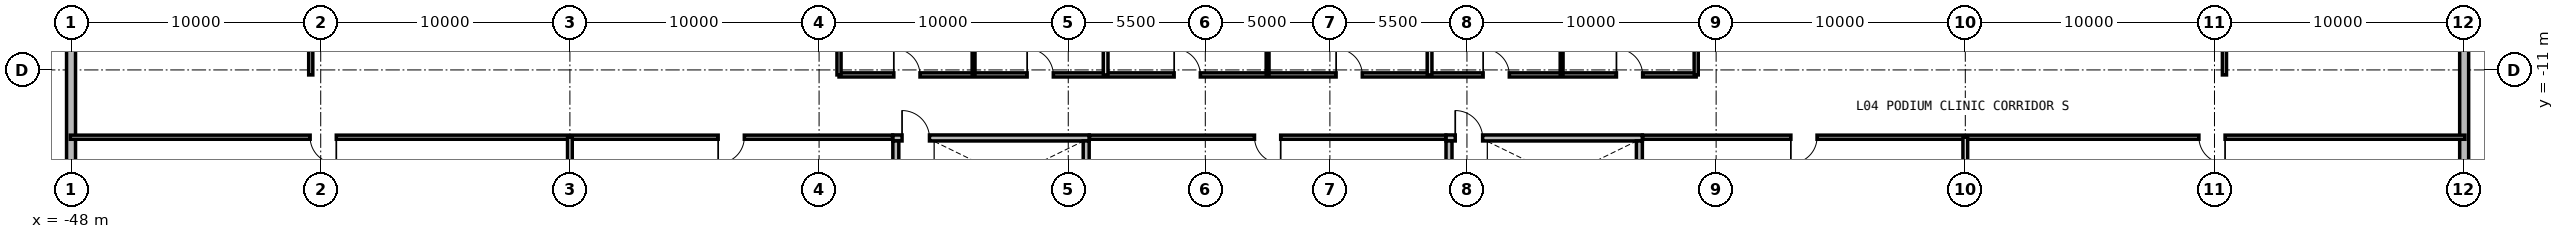
"""IFC4 building model, lengths in metres.
Left out: names, types, materials, properties, quantities, classifications, styles, units other than length and angle.
Written with IfcOpenShell. Run it as: python <this file> out.ifc"""

import sys

from ifc_helpers import new_model, si_unit, direction, frame, frame_2d, origin, place, context, subcontext, project, spatial, rectangle, extrude, source, transform, mapped, element, fill, save


model = new_model("IFC4")
c1 = context("Model", 3, precision=1e-05, world=origin(), true_north=direction((0.0, 1.0)))
c2 = subcontext(c1, "Body", "Model", "MODEL_VIEW")
j1 = project(units=[si_unit("LENGTHUNIT", "METRE"), si_unit("PLANEANGLEUNIT", "RADIAN")], contexts=[c1])
p1 = place(None, origin())
s1 = spatial("IfcSite", under=j1, at=p1, CompositionType="ELEMENT")
p2 = place(p1, origin())
s2 = spatial("IfcBuilding", under=s1, at=p2, CompositionType="ELEMENT")
p3 = place(p2, frame((0.0, 0.0, 16.8)))
s3 = spatial("IfcBuildingStorey", under=s2, at=p3, CompositionType="ELEMENT", Elevation=16.8)
m1 = source(origin(), c2, "Body", "SweptSolid", [
    extrude(rectangle(XDim=38.04, YDim=0.36, at=frame_2d((19.02, 0.0))), origin(), (0.0, 0.0, 1.0), 4.38),
])
p4 = place(p3, frame((-48.02, -19.02, 0.0), z_axis=(0.0, 0.0, 1.0), x_axis=(0.0, 1.0, 0.0)))
e1 = element("IfcWall", 1, at=p4, inside=s3, PredefinedType="SOLIDWALL", context=c2, shape_type="MappedRepresentation", body=[
    mapped(m1, transform((0.0, 0.0, 0.0), x_axis=(1.0, 0.0, 0.0), y_axis=(0.0, 1.0, 0.0), z_axis=(0.0, 0.0, 1.0), scale=1.0)),
])
p5 = place(p4, frame((12.4, 0.0, 0.85)))
e2 = element("IfcOpeningElement", 2, at=p5, cuts=e1, PredefinedType="OPENING", context=c2, shape_type="SweptSolid", body=[
    extrude(rectangle(XDim=1.2, YDim=1.5, at=frame_2d((0.6, 0.75))), frame((0.0, 0.19, 0.0), z_axis=(0.0, -1.0, 0.0), x_axis=(1.0, 0.0, 0.0)), (0.0, 0.0, 1.0), 0.38),
])
p6 = place(p4, frame((20.8, 0.0, 0.85)))
e3 = element("IfcOpeningElement", 3, at=p6, cuts=e1, PredefinedType="OPENING", context=c2, shape_type="SweptSolid", body=[
    extrude(rectangle(XDim=1.2, YDim=1.5, at=frame_2d((0.6, 0.75))), frame((0.0, 0.19, 0.0), z_axis=(0.0, -1.0, 0.0), x_axis=(1.0, 0.0, 0.0)), (0.0, 0.0, 1.0), 0.38),
])
p7 = place(p3, frame((48.02, 19.02, 0.0), z_axis=(0.0, 0.0, 1.0), x_axis=(0.0, -1.0, 0.0)))
e4 = element("IfcWall", 4, at=p7, inside=s3, PredefinedType="SOLIDWALL", context=c2, shape_type="MappedRepresentation", body=[
    mapped(m1, transform((0.0, 0.0, 0.0), x_axis=(1.0, 0.0, 0.0), y_axis=(0.0, 1.0, 0.0), z_axis=(0.0, 0.0, 1.0), scale=1.0)),
])
p8 = place(p7, frame((4.0, 0.0, 0.85)))
e5 = element("IfcOpeningElement", 5, at=p8, cuts=e4, PredefinedType="OPENING", context=c2, shape_type="SweptSolid", body=[
    extrude(rectangle(XDim=1.2, YDim=1.5, at=frame_2d((0.6, 0.75))), frame((0.0, 0.19, 0.0), z_axis=(0.0, -1.0, 0.0), x_axis=(1.0, 0.0, 0.0)), (0.0, 0.0, 1.0), 0.38),
])
p9 = place(p7, frame((12.4, 0.0, 0.85)))
e6 = element("IfcOpeningElement", 6, at=p9, cuts=e4, PredefinedType="OPENING", context=c2, shape_type="SweptSolid", body=[
    extrude(rectangle(XDim=1.2, YDim=1.5, at=frame_2d((0.6, 0.75))), frame((0.0, 0.19, 0.0), z_axis=(0.0, -1.0, 0.0), x_axis=(1.0, 0.0, 0.0)), (0.0, 0.0, 1.0), 0.38),
])
p10 = place(p7, frame((20.8, 0.0, 0.85)))
e7 = element("IfcOpeningElement", 7, at=p10, cuts=e4, PredefinedType="OPENING", context=c2, shape_type="SweptSolid", body=[
    extrude(rectangle(XDim=1.2, YDim=1.5, at=frame_2d((0.6, 0.75))), frame((0.0, 0.19, 0.0), z_axis=(0.0, -1.0, 0.0), x_axis=(1.0, 0.0, 0.0)), (0.0, 0.0, 1.0), 0.38),
])
m2 = source(origin(), c2, "Body", "SweptSolid", [
    extrude(rectangle(XDim=7.88, YDim=0.24, at=frame_2d((3.94, 0.0))), origin(), (0.0, 0.0, 1.0), 4.38),
])
p11 = place(p3, frame((-15.04, -13.73, 0.0), z_axis=(0.0, 0.0, 1.0), x_axis=(1.0, 0.0, 0.0)))
e8 = element("IfcWall", 8, at=p11, inside=s3, PredefinedType="PARTITIONING", context=c2, shape_type="MappedRepresentation", body=[
    mapped(m2, transform((0.0, 0.0, 0.0), x_axis=(1.0, 0.0, 0.0), y_axis=(0.0, 1.0, 0.0), z_axis=(0.0, 0.0, 1.0), scale=1.0)),
])
p12 = place(p11, frame((0.37, 0.0, 0.0)))
e9 = element("IfcOpeningElement", 9, at=p12, cuts=e8, PredefinedType="OPENING", context=c2, shape_type="SweptSolid", body=[
    extrude(rectangle(XDim=1.1, YDim=2.15, at=frame_2d((0.55, 1.075))), frame((0.0, 0.13, 0.0), z_axis=(0.0, -1.0, 0.0), x_axis=(1.0, 0.0, 0.0)), (0.0, 0.0, 1.0), 0.26),
])
m3 = source(origin(), c2, "Body", "SweptSolid", [
    extrude(rectangle(XDim=2.95, YDim=0.24, at=frame_2d((1.475, 0.0))), origin(), (0.0, 0.0, 1.0), 4.38),
])
for number, where, z_axis, x_axis in (
    (10, (-14.92, -16.8, 0.0), (0.0, 0.0, 1.0), (0.0, 1.0, 0.0)),
    (11, (-7.28, -16.8, 0.0), (0.0, 0.0, 1.0), (0.0, 1.0, 0.0)),
):
    element("IfcWall", number, at=place(p3, frame(where, z_axis=z_axis, x_axis=x_axis)), inside=s3, PredefinedType="PARTITIONING", context=c2, shape_type="MappedRepresentation", body=[
        mapped(m3, transform((0.0, 0.0, 0.0), x_axis=(1.0, 0.0, 0.0), y_axis=(0.0, 1.0, 0.0), z_axis=(0.0, 0.0, 1.0), scale=1.0)),
    ])
p13 = place(p3, frame((7.16, -13.73, 0.0), z_axis=(0.0, 0.0, 1.0), x_axis=(1.0, 0.0, 0.0)))
e12 = element("IfcWall", 12, at=p13, inside=s3, PredefinedType="PARTITIONING", context=c2, shape_type="MappedRepresentation", body=[
    mapped(m2, transform((0.0, 0.0, 0.0), x_axis=(1.0, 0.0, 0.0), y_axis=(0.0, 1.0, 0.0), z_axis=(0.0, 0.0, 1.0), scale=1.0)),
])
p14 = place(p13, frame((0.37, 0.0, 0.0)))
e13 = element("IfcOpeningElement", 13, at=p14, cuts=e12, PredefinedType="OPENING", context=c2, shape_type="SweptSolid", body=[
    extrude(rectangle(XDim=1.1, YDim=2.15, at=frame_2d((0.55, 1.075))), frame((0.0, 0.13, 0.0), z_axis=(0.0, -1.0, 0.0), x_axis=(1.0, 0.0, 0.0)), (0.0, 0.0, 1.0), 0.26),
])
for number, where, z_axis, x_axis in (
    (14, (7.28, -16.8, 0.0), (0.0, 0.0, 1.0), (0.0, 1.0, 0.0)),
    (15, (14.92, -16.8, 0.0), (0.0, 0.0, 1.0), (0.0, 1.0, 0.0)),
):
    element("IfcWall", number, at=place(p3, frame(where, z_axis=z_axis, x_axis=x_axis)), inside=s3, PredefinedType="PARTITIONING", context=c2, shape_type="MappedRepresentation", body=[
        mapped(m3, transform((0.0, 0.0, 0.0), x_axis=(1.0, 0.0, 0.0), y_axis=(0.0, 1.0, 0.0), z_axis=(0.0, 0.0, 1.0), scale=1.0)),
    ])
m4 = source(origin(), c2, "Body", "SweptSolid", [
    extrude(rectangle(XDim=17.6, YDim=0.165, at=frame_2d((8.8, 0.0))), origin(), (0.0, 0.0, 1.0), 4.365),
])
p15 = place(p3, frame((-38.4, -11.2, 0.0), z_axis=(0.0, 0.0, 1.0), x_axis=(0.0, 1.0, 0.0)))
e16 = element("IfcWall", 16, at=p15, inside=s3, PredefinedType="PARTITIONING", context=c2, shape_type="MappedRepresentation", body=[
    mapped(m4, transform((0.0, 0.0, 0.0), x_axis=(1.0, 0.0, 0.0), y_axis=(0.0, 1.0, 0.0), z_axis=(0.0, 0.0, 1.0), scale=1.0)),
])
p16 = place(p15, frame((4.2, 0.0, 0.0)))
e17 = element("IfcOpeningElement", 17, at=p16, cuts=e16, PredefinedType="OPENING", context=c2, shape_type="SweptSolid", body=[
    extrude(rectangle(XDim=1.25, YDim=2.2, at=frame_2d((0.625, 1.1))), frame((0.0, 0.093, 0.0), z_axis=(0.0, -1.0, 0.0), x_axis=(1.0, 0.0, 0.0)), (0.0, 0.0, 1.0), 0.185),
])
p17 = place(p15, frame((13.5, 0.0, 0.0)))
e18 = element("IfcOpeningElement", 18, at=p17, cuts=e16, PredefinedType="OPENING", context=c2, shape_type="SweptSolid", body=[
    extrude(rectangle(XDim=1.25, YDim=2.2, at=frame_2d((0.625, 1.1))), frame((0.0, 0.093, 0.0), z_axis=(0.0, -1.0, 0.0), x_axis=(1.0, 0.0, 0.0)), (0.0, 0.0, 1.0), 0.185),
])
p18 = place(p3, frame((38.4, -11.2, 0.0), z_axis=(0.0, 0.0, 1.0), x_axis=(0.0, 1.0, 0.0)))
e19 = element("IfcWall", 19, at=p18, inside=s3, PredefinedType="PARTITIONING", context=c2, shape_type="MappedRepresentation", body=[
    mapped(m4, transform((0.0, 0.0, 0.0), x_axis=(1.0, 0.0, 0.0), y_axis=(0.0, 1.0, 0.0), z_axis=(0.0, 0.0, 1.0), scale=1.0)),
])
p19 = place(p18, frame((4.2, 0.0, 0.0)))
e20 = element("IfcOpeningElement", 20, at=p19, cuts=e19, PredefinedType="OPENING", context=c2, shape_type="SweptSolid", body=[
    extrude(rectangle(XDim=1.25, YDim=2.2, at=frame_2d((0.625, 1.1))), frame((0.0, 0.093, 0.0), z_axis=(0.0, -1.0, 0.0), x_axis=(1.0, 0.0, 0.0)), (0.0, 0.0, 1.0), 0.185),
])
p20 = place(p18, frame((13.5, 0.0, 0.0)))
e21 = element("IfcOpeningElement", 21, at=p20, cuts=e19, PredefinedType="OPENING", context=c2, shape_type="SweptSolid", body=[
    extrude(rectangle(XDim=1.25, YDim=2.2, at=frame_2d((0.625, 1.1))), frame((0.0, 0.093, 0.0), z_axis=(0.0, -1.0, 0.0), x_axis=(1.0, 0.0, 0.0)), (0.0, 0.0, 1.0), 0.185),
])
m5 = source(origin(), c2, "Body", "SweptSolid", [
    extrude(rectangle(XDim=34.4, YDim=0.165, at=frame_2d((17.2, 0.0))), origin(), (0.0, 0.0, 1.0), 4.365),
])
p21 = place(p3, frame((-17.2, -11.2, 0.0), z_axis=(0.0, 0.0, 1.0), x_axis=(1.0, 0.0, 0.0)))
e22 = element("IfcWall", 22, at=p21, inside=s3, PredefinedType="PARTITIONING", context=c2, shape_type="MappedRepresentation", body=[
    mapped(m5, transform((0.0, 0.0, 0.0), x_axis=(1.0, 0.0, 0.0), y_axis=(0.0, 1.0, 0.0), z_axis=(0.0, 0.0, 1.0), scale=1.0)),
])
p22 = place(p21, frame((2.2, 0.0, 0.0)))
e23 = element("IfcOpeningElement", 23, at=p22, cuts=e22, PredefinedType="OPENING", context=c2, shape_type="SweptSolid", body=[
    extrude(rectangle(XDim=1.05, YDim=2.15, at=frame_2d((0.525, 1.075))), frame((0.0, 0.093, 0.0), z_axis=(0.0, -1.0, 0.0), x_axis=(1.0, 0.0, 0.0)), (0.0, 0.0, 1.0), 0.185),
])
p23 = place(p21, frame((7.55, 0.0, 0.0)))
e24 = element("IfcOpeningElement", 24, at=p23, cuts=e22, PredefinedType="OPENING", context=c2, shape_type="SweptSolid", body=[
    extrude(rectangle(XDim=1.05, YDim=2.15, at=frame_2d((0.525, 1.075))), frame((0.0, 0.093, 0.0), z_axis=(0.0, -1.0, 0.0), x_axis=(1.0, 0.0, 0.0)), (0.0, 0.0, 1.0), 0.185),
])
p24 = place(p21, frame((13.45, 0.0, 0.0)))
e25 = element("IfcOpeningElement", 25, at=p24, cuts=e22, PredefinedType="OPENING", context=c2, shape_type="SweptSolid", body=[
    extrude(rectangle(XDim=1.05, YDim=2.15, at=frame_2d((0.525, 1.075))), frame((0.0, 0.093, 0.0), z_axis=(0.0, -1.0, 0.0), x_axis=(1.0, 0.0, 0.0)), (0.0, 0.0, 1.0), 0.185),
])
p25 = place(p21, frame((19.95, 0.0, 0.0)))
e26 = element("IfcOpeningElement", 26, at=p25, cuts=e22, PredefinedType="OPENING", context=c2, shape_type="SweptSolid", body=[
    extrude(rectangle(XDim=1.05, YDim=2.15, at=frame_2d((0.525, 1.075))), frame((0.0, 0.093, 0.0), z_axis=(0.0, -1.0, 0.0), x_axis=(1.0, 0.0, 0.0)), (0.0, 0.0, 1.0), 0.185),
])
p26 = place(p21, frame((25.85, 0.0, 0.0)))
e27 = element("IfcOpeningElement", 27, at=p26, cuts=e22, PredefinedType="OPENING", context=c2, shape_type="SweptSolid", body=[
    extrude(rectangle(XDim=1.05, YDim=2.15, at=frame_2d((0.525, 1.075))), frame((0.0, 0.093, 0.0), z_axis=(0.0, -1.0, 0.0), x_axis=(1.0, 0.0, 0.0)), (0.0, 0.0, 1.0), 0.185),
])
p27 = place(p21, frame((31.2, 0.0, 0.0)))
e28 = element("IfcOpeningElement", 28, at=p27, cuts=e22, PredefinedType="OPENING", context=c2, shape_type="SweptSolid", body=[
    extrude(rectangle(XDim=1.05, YDim=2.15, at=frame_2d((0.525, 1.075))), frame((0.0, 0.093, 0.0), z_axis=(0.0, -1.0, 0.0), x_axis=(1.0, 0.0, 0.0)), (0.0, 0.0, 1.0), 0.185),
])
p28 = place(p3, frame((-17.2, -11.2, 0.0), z_axis=(0.0, 0.0, 1.0), x_axis=(0.0, 1.0, 0.0)))
e29 = element("IfcWall", 29, at=p28, inside=s3, PredefinedType="PARTITIONING", context=c2, shape_type="MappedRepresentation", body=[
    mapped(m4, transform((0.0, 0.0, 0.0), x_axis=(1.0, 0.0, 0.0), y_axis=(0.0, 1.0, 0.0), z_axis=(0.0, 0.0, 1.0), scale=1.0)),
])
m6 = source(origin(), c2, "Body", "SweptSolid", [
    extrude(rectangle(XDim=17.6, YDim=0.165, at=frame_2d((8.8, 0.0))), origin(), (0.0, 0.0, 1.0), 2.765),
])
p29 = place(p3, frame((17.2, -11.2, 0.0), z_axis=(0.0, 0.0, 1.0), x_axis=(0.0, 1.0, 0.0)))
e30 = element("IfcWall", 30, at=p29, inside=s3, PredefinedType="PARTITIONING", context=c2, shape_type="MappedRepresentation", body=[
    mapped(m6, transform((0.0, 0.0, 0.0), x_axis=(1.0, 0.0, 0.0), y_axis=(0.0, 1.0, 0.0), z_axis=(0.0, 0.0, 1.0), scale=1.0)),
])
m7 = source(origin(), c2, "Body", "SweptSolid", [
    extrude(rectangle(XDim=17.6, YDim=0.19, at=frame_2d((8.8, 0.0))), origin(), (0.0, 0.0, 1.0), 2.765),
])
for number, where, z_axis, x_axis in (
    (31, (-6.5, -11.2, 0.0), (0.0, 0.0, 1.0), (0.0, 1.0, 0.0)),
    (32, (6.5, -11.2, 0.0), (0.0, 0.0, 1.0), (0.0, 1.0, 0.0)),
):
    element("IfcWall", number, at=place(p3, frame(where, z_axis=z_axis, x_axis=x_axis)), inside=s3, PredefinedType="PARTITIONING", context=c2, shape_type="MappedRepresentation", body=[
        mapped(m7, transform((0.0, 0.0, 0.0), x_axis=(1.0, 0.0, 0.0), y_axis=(0.0, 1.0, 0.0), z_axis=(0.0, 0.0, 1.0), scale=1.0)),
    ])
m8 = source(origin(), c2, "Body", "SweptSolid", [
    extrude(rectangle(XDim=17.6, YDim=0.115, at=frame_2d((8.8, 0.0))), origin(), (0.0, 0.0, 1.0), 4.365),
])
for number, where, z_axis, x_axis in (
    (33, (-11.8, -11.2, 0.0), (0.0, 0.0, 1.0), (0.0, 1.0, 0.0)),
    (34, (0.0, -11.2, 0.0), (0.0, 0.0, 1.0), (0.0, 1.0, 0.0)),
    (35, (11.8, -11.2, 0.0), (0.0, 0.0, 1.0), (0.0, 1.0, 0.0)),
):
    element("IfcWall", number, at=place(p3, frame(where, z_axis=z_axis, x_axis=x_axis)), inside=s3, PredefinedType="PARTITIONING", context=c2, shape_type="MappedRepresentation", body=[
        mapped(m8, transform((0.0, 0.0, 0.0), x_axis=(1.0, 0.0, 0.0), y_axis=(0.0, 1.0, 0.0), z_axis=(0.0, 0.0, 1.0), scale=1.0)),
    ])
m9 = source(origin(), c2, "Body", "SweptSolid", [
    extrude(rectangle(XDim=33.0, YDim=0.165, at=frame_2d((16.5, 0.0))), origin(), (0.0, 0.0, 1.0), 4.365),
])
p30 = place(p3, frame((-48.05, -13.7, 0.0), z_axis=(0.0, 0.0, 1.0), x_axis=(1.0, 0.0, 0.0)))
e36 = element("IfcWall", 36, at=p30, inside=s3, PredefinedType="PARTITIONING", context=c2, shape_type="MappedRepresentation", body=[
    mapped(m9, transform((0.0, 0.0, 0.0), x_axis=(1.0, 0.0, 0.0), y_axis=(0.0, 1.0, 0.0), z_axis=(0.0, 0.0, 1.0), scale=1.0)),
])
p31 = place(p30, frame((9.625, 0.0, 0.0)))
e37 = element("IfcOpeningElement", 37, at=p31, cuts=e36, PredefinedType="OPENING", context=c2, shape_type="SweptSolid", body=[
    extrude(rectangle(XDim=1.05, YDim=2.15, at=frame_2d((0.525, 1.075))), frame((0.0, 0.093, 0.0), z_axis=(0.0, -1.0, 0.0), x_axis=(1.0, 0.0, 0.0)), (0.0, 0.0, 1.0), 0.185),
])
p32 = place(p30, frame((26.0, 0.0, 0.0)))
e38 = element("IfcOpeningElement", 38, at=p32, cuts=e36, PredefinedType="OPENING", context=c2, shape_type="SweptSolid", body=[
    extrude(rectangle(XDim=1.05, YDim=2.15, at=frame_2d((0.525, 1.075))), frame((0.0, 0.093, 0.0), z_axis=(0.0, -1.0, 0.0), x_axis=(1.0, 0.0, 0.0)), (0.0, 0.0, 1.0), 0.185),
])
m10 = source(origin(), c2, "Body", "SweptSolid", [
    extrude(rectangle(XDim=14.3, YDim=0.165, at=frame_2d((7.15, 0.0))), origin(), (0.0, 0.0, 1.0), 4.365),
])
p33 = place(p3, frame((-7.15, -13.7, 0.0), z_axis=(0.0, 0.0, 1.0), x_axis=(1.0, 0.0, 0.0)))
e39 = element("IfcWall", 39, at=p33, inside=s3, PredefinedType="PARTITIONING", context=c2, shape_type="MappedRepresentation", body=[
    mapped(m10, transform((0.0, 0.0, 0.0), x_axis=(1.0, 0.0, 0.0), y_axis=(0.0, 1.0, 0.0), z_axis=(0.0, 0.0, 1.0), scale=1.0)),
])
p34 = place(p33, frame((6.625, 0.0, 0.0)))
e40 = element("IfcOpeningElement", 40, at=p34, cuts=e39, PredefinedType="OPENING", context=c2, shape_type="SweptSolid", body=[
    extrude(rectangle(XDim=1.05, YDim=2.15, at=frame_2d((0.525, 1.075))), frame((0.0, 0.093, 0.0), z_axis=(0.0, -1.0, 0.0), x_axis=(1.0, 0.0, 0.0)), (0.0, 0.0, 1.0), 0.185),
])
p35 = place(p3, frame((15.05, -13.7, 0.0), z_axis=(0.0, 0.0, 1.0), x_axis=(1.0, 0.0, 0.0)))
e41 = element("IfcWall", 41, at=p35, inside=s3, PredefinedType="PARTITIONING", context=c2, shape_type="MappedRepresentation", body=[
    mapped(m9, transform((0.0, 0.0, 0.0), x_axis=(1.0, 0.0, 0.0), y_axis=(0.0, 1.0, 0.0), z_axis=(0.0, 0.0, 1.0), scale=1.0)),
])
p36 = place(p35, frame((5.95, 0.0, 0.0)))
e42 = element("IfcOpeningElement", 42, at=p36, cuts=e41, PredefinedType="OPENING", context=c2, shape_type="SweptSolid", body=[
    extrude(rectangle(XDim=1.05, YDim=2.15, at=frame_2d((0.525, 1.075))), frame((0.0, 0.093, 0.0), z_axis=(0.0, -1.0, 0.0), x_axis=(1.0, 0.0, 0.0)), (0.0, 0.0, 1.0), 0.185),
])
p37 = place(p35, frame((22.325, 0.0, 0.0)))
e43 = element("IfcOpeningElement", 43, at=p37, cuts=e41, PredefinedType="OPENING", context=c2, shape_type="SweptSolid", body=[
    extrude(rectangle(XDim=1.05, YDim=2.15, at=frame_2d((0.525, 1.075))), frame((0.0, 0.093, 0.0), z_axis=(0.0, -1.0, 0.0), x_axis=(1.0, 0.0, 0.0)), (0.0, 0.0, 1.0), 0.185),
])
m11 = source(origin(), c2, "Body", "SweptSolid", [
    extrude(rectangle(XDim=5.4, YDim=0.19, at=frame_2d((2.7, 0.0))), origin(), (0.0, 0.0, 1.0), 4.365),
])
for number, where, z_axis, x_axis in (
    (44, (-28.0, -19.1, 0.0), (0.0, 0.0, 1.0), (0.0, 1.0, 0.0)),
    (45, (28.0, -19.1, 0.0), (0.0, 0.0, 1.0), (0.0, 1.0, 0.0)),
):
    element("IfcWall", number, at=place(p3, frame(where, z_axis=z_axis, x_axis=x_axis)), inside=s3, PredefinedType="PARTITIONING", context=c2, shape_type="MappedRepresentation", body=[
        mapped(m11, transform((0.0, 0.0, 0.0), x_axis=(1.0, 0.0, 0.0), y_axis=(0.0, 1.0, 0.0), z_axis=(0.0, 0.0, 1.0), scale=1.0)),
    ])
m12 = source(origin(), c2, "Body", "SweptSolid", [
    extrude(rectangle(XDim=1.1, YDim=2.15, at=frame_2d((0.55, 1.075))), frame((0.0, 0.025, 0.0), z_axis=(0.0, -1.0, 0.0), x_axis=(1.0, 0.0, 0.0)), (0.0, 0.0, 1.0), 0.05),
])
p38 = place(p12, origin())
e46 = element("IfcDoor", 46, at=p38, inside=s3, OperationType="SINGLE_SWING_LEFT", PredefinedType="DOOR", context=c2, shape_type="MappedRepresentation", body=[
    mapped(m12, transform((0.0, 0.0, 0.0), x_axis=(1.0, 0.0, 0.0), y_axis=(0.0, 1.0, 0.0), z_axis=(0.0, 0.0, 1.0), scale=1.0)),
])
fill(e9, e46)
p39 = place(p14, origin())
e47 = element("IfcDoor", 47, at=p39, inside=s3, OperationType="SINGLE_SWING_LEFT", PredefinedType="DOOR", context=c2, shape_type="MappedRepresentation", body=[
    mapped(m12, transform((0.0, 0.0, 0.0), x_axis=(1.0, 0.0, 0.0), y_axis=(0.0, 1.0, 0.0), z_axis=(0.0, 0.0, 1.0), scale=1.0)),
])
fill(e13, e47)
m13 = source(origin(), c2, "Body", "SweptSolid", [
    extrude(rectangle(XDim=1.05, YDim=2.15, at=frame_2d((0.525, 1.075))), frame((0.0, 0.025, 0.0), z_axis=(0.0, -1.0, 0.0), x_axis=(1.0, 0.0, 0.0)), (0.0, 0.0, 1.0), 0.05),
])
p40 = place(p22, origin())
e48 = element("IfcDoor", 48, at=p40, inside=s3, OperationType="SINGLE_SWING_LEFT", PredefinedType="DOOR", context=c2, shape_type="MappedRepresentation", body=[
    mapped(m13, transform((0.0, 0.0, 0.0), x_axis=(1.0, 0.0, 0.0), y_axis=(0.0, 1.0, 0.0), z_axis=(0.0, 0.0, 1.0), scale=1.0)),
])
fill(e23, e48)
p41 = place(p23, origin())
e49 = element("IfcDoor", 49, at=p41, inside=s3, OperationType="SINGLE_SWING_LEFT", PredefinedType="DOOR", context=c2, shape_type="MappedRepresentation", body=[
    mapped(m13, transform((0.0, 0.0, 0.0), x_axis=(1.0, 0.0, 0.0), y_axis=(0.0, 1.0, 0.0), z_axis=(0.0, 0.0, 1.0), scale=1.0)),
])
fill(e24, e49)
p42 = place(p24, origin())
e50 = element("IfcDoor", 50, at=p42, inside=s3, OperationType="SINGLE_SWING_LEFT", PredefinedType="DOOR", context=c2, shape_type="MappedRepresentation", body=[
    mapped(m13, transform((0.0, 0.0, 0.0), x_axis=(1.0, 0.0, 0.0), y_axis=(0.0, 1.0, 0.0), z_axis=(0.0, 0.0, 1.0), scale=1.0)),
])
fill(e25, e50)
p43 = place(p25, origin())
e51 = element("IfcDoor", 51, at=p43, inside=s3, OperationType="SINGLE_SWING_LEFT", PredefinedType="DOOR", context=c2, shape_type="MappedRepresentation", body=[
    mapped(m13, transform((0.0, 0.0, 0.0), x_axis=(1.0, 0.0, 0.0), y_axis=(0.0, 1.0, 0.0), z_axis=(0.0, 0.0, 1.0), scale=1.0)),
])
fill(e26, e51)
p44 = place(p26, origin())
e52 = element("IfcDoor", 52, at=p44, inside=s3, OperationType="SINGLE_SWING_LEFT", PredefinedType="DOOR", context=c2, shape_type="MappedRepresentation", body=[
    mapped(m13, transform((0.0, 0.0, 0.0), x_axis=(1.0, 0.0, 0.0), y_axis=(0.0, 1.0, 0.0), z_axis=(0.0, 0.0, 1.0), scale=1.0)),
])
fill(e27, e52)
p45 = place(p27, origin())
e53 = element("IfcDoor", 53, at=p45, inside=s3, OperationType="SINGLE_SWING_LEFT", PredefinedType="DOOR", context=c2, shape_type="MappedRepresentation", body=[
    mapped(m13, transform((0.0, 0.0, 0.0), x_axis=(1.0, 0.0, 0.0), y_axis=(0.0, 1.0, 0.0), z_axis=(0.0, 0.0, 1.0), scale=1.0)),
])
fill(e28, e53)
p46 = place(p31, frame((1.05, 0.0, 0.0), z_axis=(0.0, 0.0, 1.0), x_axis=(-1.0, 0.0, 0.0)))
e54 = element("IfcDoor", 54, at=p46, inside=s3, OperationType="SINGLE_SWING_LEFT", PredefinedType="DOOR", context=c2, shape_type="MappedRepresentation", body=[
    mapped(m13, transform((0.0, 0.0, 0.0), x_axis=(1.0, 0.0, 0.0), y_axis=(0.0, 1.0, 0.0), z_axis=(0.0, 0.0, 1.0), scale=1.0)),
])
fill(e37, e54)
p47 = place(p32, frame((1.05, 0.0, 0.0), z_axis=(0.0, 0.0, 1.0), x_axis=(-1.0, 0.0, 0.0)))
e55 = element("IfcDoor", 55, at=p47, inside=s3, OperationType="SINGLE_SWING_RIGHT", PredefinedType="DOOR", context=c2, shape_type="MappedRepresentation", body=[
    mapped(m13, transform((0.0, 0.0, 0.0), x_axis=(1.0, 0.0, 0.0), y_axis=(0.0, 1.0, 0.0), z_axis=(0.0, 0.0, 1.0), scale=1.0)),
])
fill(e38, e55)
p48 = place(p34, frame((1.05, 0.0, 0.0), z_axis=(0.0, 0.0, 1.0), x_axis=(-1.0, 0.0, 0.0)))
e56 = element("IfcDoor", 56, at=p48, inside=s3, OperationType="SINGLE_SWING_LEFT", PredefinedType="DOOR", context=c2, shape_type="MappedRepresentation", body=[
    mapped(m13, transform((0.0, 0.0, 0.0), x_axis=(1.0, 0.0, 0.0), y_axis=(0.0, 1.0, 0.0), z_axis=(0.0, 0.0, 1.0), scale=1.0)),
])
fill(e40, e56)
p49 = place(p36, frame((1.05, 0.0, 0.0), z_axis=(0.0, 0.0, 1.0), x_axis=(-1.0, 0.0, 0.0)))
e57 = element("IfcDoor", 57, at=p49, inside=s3, OperationType="SINGLE_SWING_RIGHT", PredefinedType="DOOR", context=c2, shape_type="MappedRepresentation", body=[
    mapped(m13, transform((0.0, 0.0, 0.0), x_axis=(1.0, 0.0, 0.0), y_axis=(0.0, 1.0, 0.0), z_axis=(0.0, 0.0, 1.0), scale=1.0)),
])
fill(e42, e57)
p50 = place(p37, frame((1.05, 0.0, 0.0), z_axis=(0.0, 0.0, 1.0), x_axis=(-1.0, 0.0, 0.0)))
e58 = element("IfcDoor", 58, at=p50, inside=s3, OperationType="SINGLE_SWING_LEFT", PredefinedType="DOOR", context=c2, shape_type="MappedRepresentation", body=[
    mapped(m13, transform((0.0, 0.0, 0.0), x_axis=(1.0, 0.0, 0.0), y_axis=(0.0, 1.0, 0.0), z_axis=(0.0, 0.0, 1.0), scale=1.0)),
])
fill(e43, e58)
save(model, sys.argv[1])
